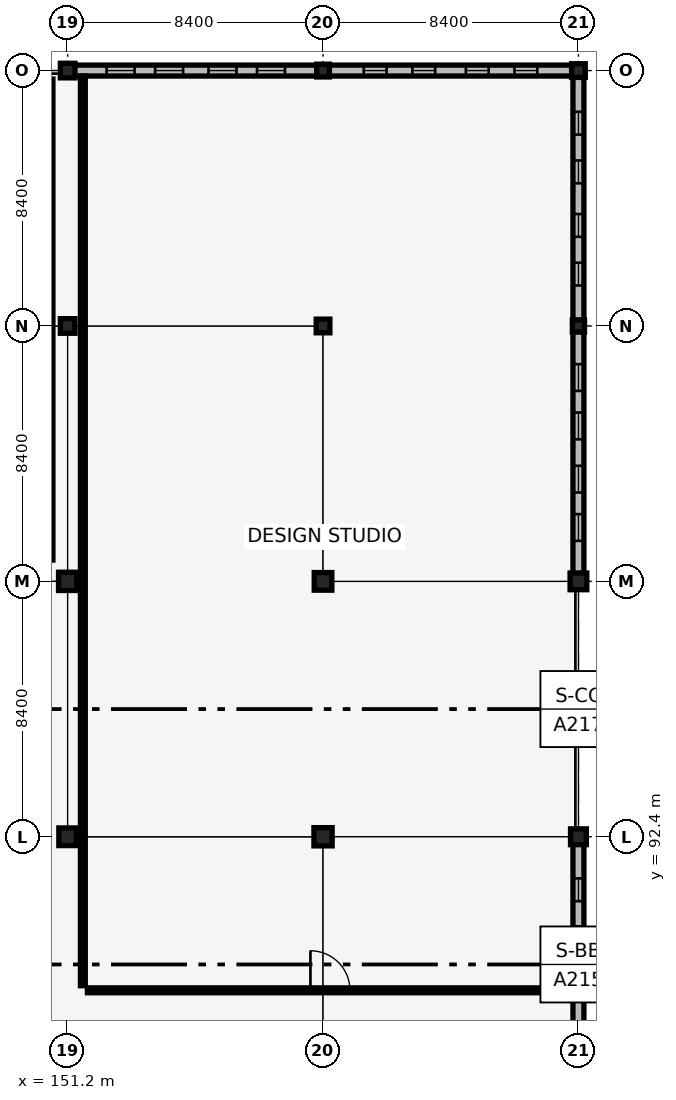
"""IFC4 building model, lengths in metres.
Left out: names, types, materials, properties, quantities, classifications, styles, units other than length and angle.
Written with IfcOpenShell. Run it as: python <this file> out.ifc"""

import sys

from ifc_helpers import new_model, si_unit, direction, frame, frame_2d, origin, origin_2d, place, context, subcontext, project, spatial, rectangle, extrude, element, fill, save


model = new_model("IFC4")
c1 = context("Model", 3, precision=1e-05, world=origin(), true_north=direction((0.0, 1.0)))
c2 = subcontext(c1, "Body", "Model", "MODEL_VIEW")
j1 = project(units=[si_unit("LENGTHUNIT", "METRE"), si_unit("PLANEANGLEUNIT", "RADIAN")], contexts=[c1])
p1 = place(None, origin())
s1 = spatial("IfcSite", under=j1, at=p1, CompositionType="ELEMENT")
p2 = place(p1, origin())
s2 = spatial("IfcBuilding", under=s1, at=p2, CompositionType="ELEMENT")
p3 = place(p2, frame((0.0, 0.0, 18.02)))
s3 = spatial("IfcBuildingStorey", under=s2, at=p3, CompositionType="ELEMENT", Elevation=18.02)
p4 = place(p3, frame((151.2, 92.4, 0.0), z_axis=(0.0, 0.0, 1.0), x_axis=(1.0, 0.0, 0.0)))
e1 = element("IfcColumn", 1, at=p4, inside=s3, PredefinedType="COLUMN", context=c2, shape_type="SweptSolid", body=[
    extrude(rectangle(XDim=0.58, YDim=0.58, at=origin_2d()), origin(), (0.0, 0.0, 1.0), 3.78),
])
p5 = place(p3, frame((151.2, 100.8, 0.0), z_axis=(0.0, 0.0, 1.0), x_axis=(1.0, 0.0, 0.0)))
e2 = element("IfcColumn", 2, at=p5, inside=s3, PredefinedType="COLUMN", context=c2, shape_type="SweptSolid", body=[
    extrude(rectangle(XDim=0.6, YDim=0.6, at=origin_2d()), origin(), (0.0, 0.0, 1.0), 3.78),
])
for number, where, z_axis, x_axis in (
    (3, (151.2, 109.2, 0.0), (0.0, 0.0, 1.0), (1.0, 0.0, 0.0)),
    (4, (151.2, 117.6, 0.0), (0.0, 0.0, 1.0), (1.0, 0.0, 0.0)),
):
    element("IfcColumn", number, at=place(p3, frame(where, z_axis=z_axis, x_axis=x_axis)), inside=s3, PredefinedType="COLUMN", context=c2, shape_type="SweptSolid", body=[
        extrude(rectangle(XDim=0.48, YDim=0.48, at=origin_2d()), origin(), (0.0, 0.0, 1.0), 3.78),
    ])
p6 = place(p3, frame((159.6, 92.4, 0.0), z_axis=(0.0, 0.0, 1.0), x_axis=(1.0, 0.0, 0.0)))
e5 = element("IfcColumn", 5, at=p6, inside=s3, PredefinedType="COLUMN", context=c2, shape_type="SweptSolid", body=[
    extrude(rectangle(XDim=0.6, YDim=0.6, at=origin_2d()), origin(), (0.0, 0.0, 1.0), 3.78),
])
p7 = place(p3, frame((159.6, 100.8, 0.0), z_axis=(0.0, 0.0, 1.0), x_axis=(1.0, 0.0, 0.0)))
e6 = element("IfcColumn", 6, at=p7, inside=s3, PredefinedType="COLUMN", context=c2, shape_type="SweptSolid", body=[
    extrude(rectangle(XDim=0.58, YDim=0.58, at=origin_2d()), origin(), (0.0, 0.0, 1.0), 3.78),
])
p8 = place(p3, frame((159.6, 109.2, 0.0), z_axis=(0.0, 0.0, 1.0), x_axis=(1.0, 0.0, 0.0)))
e7 = element("IfcColumn", 7, at=p8, inside=s3, PredefinedType="COLUMN", context=c2, shape_type="SweptSolid", body=[
    extrude(rectangle(XDim=0.45, YDim=0.45, at=origin_2d()), origin(), (0.0, 0.0, 1.0), 3.78),
])
p9 = place(p3, frame((159.6, 117.6, 0.0), z_axis=(0.0, 0.0, 1.0), x_axis=(1.0, 0.0, 0.0)))
e8 = element("IfcColumn", 8, at=p9, inside=s3, PredefinedType="COLUMN", context=c2, shape_type="SweptSolid", body=[
    extrude(rectangle(XDim=0.42, YDim=0.42, at=origin_2d()), origin(), (0.0, 0.0, 1.0), 3.78),
])
p10 = place(p3, frame((168.0, 92.4, 0.0), z_axis=(0.0, 0.0, 1.0), x_axis=(1.0, 0.0, 0.0)))
e9 = element("IfcColumn", 9, at=p10, inside=s3, PredefinedType="COLUMN", context=c2, shape_type="SweptSolid", body=[
    extrude(rectangle(XDim=0.52, YDim=0.52, at=origin_2d()), origin(), (0.0, 0.0, 1.0), 3.78),
])
p11 = place(p3, frame((168.0, 100.8, 0.0), z_axis=(0.0, 0.0, 1.0), x_axis=(1.0, 0.0, 0.0)))
e10 = element("IfcColumn", 10, at=p11, inside=s3, PredefinedType="COLUMN", context=c2, shape_type="SweptSolid", body=[
    extrude(rectangle(XDim=0.55, YDim=0.55, at=origin_2d()), origin(), (0.0, 0.0, 1.0), 3.78),
])
p12 = place(p3, frame((168.0, 109.2, 0.0), z_axis=(0.0, 0.0, 1.0), x_axis=(1.0, 0.0, 0.0)))
e11 = element("IfcColumn", 11, at=p12, inside=s3, PredefinedType="COLUMN", context=c2, shape_type="SweptSolid", body=[
    extrude(rectangle(XDim=0.4, YDim=0.4, at=origin_2d()), origin(), (0.0, 0.0, 1.0), 3.78),
])
p13 = place(p3, frame((168.0, 117.6, 0.0), z_axis=(0.0, 0.0, 1.0), x_axis=(1.0, 0.0, 0.0)))
e12 = element("IfcColumn", 12, at=p13, inside=s3, PredefinedType="COLUMN", context=c2, shape_type="SweptSolid", body=[
    extrude(rectangle(XDim=0.45, YDim=0.45, at=origin_2d()), origin(), (0.0, 0.0, 1.0), 3.78),
])
p14 = place(p3, frame((151.425, 117.6, 0.0), z_axis=(0.0, 0.0, 1.0), x_axis=(1.0, 0.0, 0.0)))
e13 = element("IfcWall", 13, at=p14, inside=s3, PredefinedType="SOLIDWALL", context=c2, shape_type="SweptSolid", body=[
    extrude(rectangle(XDim=7.98, YDim=0.36, at=frame_2d((3.99, 0.0))), origin(), (0.0, 0.0, 1.0), 3.78),
])
p15 = place(p14, frame((1.056, 0.0, 0.75)))
e14 = element("IfcOpeningElement", 14, at=p15, cuts=e13, PredefinedType="OPENING", context=c2, shape_type="SweptSolid", body=[
    extrude(rectangle(XDim=0.92, YDim=2.5, at=frame_2d((0.46, 1.25))), frame((0.0, 0.19, 0.0), z_axis=(0.0, -1.0, 0.0), x_axis=(1.0, 0.0, 0.0)), (0.0, 0.0, 1.0), 0.38),
])
p16 = place(p14, frame((2.652, 0.0, 0.75)))
e15 = element("IfcOpeningElement", 15, at=p16, cuts=e13, PredefinedType="OPENING", context=c2, shape_type="SweptSolid", body=[
    extrude(rectangle(XDim=0.92, YDim=2.5, at=frame_2d((0.46, 1.25))), frame((0.0, 0.19, 0.0), z_axis=(0.0, -1.0, 0.0), x_axis=(1.0, 0.0, 0.0)), (0.0, 0.0, 1.0), 0.38),
])
p17 = place(p14, frame((4.408, 0.0, 0.75)))
e16 = element("IfcOpeningElement", 16, at=p17, cuts=e13, PredefinedType="OPENING", context=c2, shape_type="SweptSolid", body=[
    extrude(rectangle(XDim=0.92, YDim=2.5, at=frame_2d((0.46, 1.25))), frame((0.0, 0.19, 0.0), z_axis=(0.0, -1.0, 0.0), x_axis=(1.0, 0.0, 0.0)), (0.0, 0.0, 1.0), 0.38),
])
p18 = place(p14, frame((6.004, 0.0, 0.75)))
e17 = element("IfcOpeningElement", 17, at=p18, cuts=e13, PredefinedType="OPENING", context=c2, shape_type="SweptSolid", body=[
    extrude(rectangle(XDim=0.92, YDim=2.5, at=frame_2d((0.46, 1.25))), frame((0.0, 0.19, 0.0), z_axis=(0.0, -1.0, 0.0), x_axis=(1.0, 0.0, 0.0)), (0.0, 0.0, 1.0), 0.38),
])
p19 = place(p3, frame((168.0, 84.26, 0.0), z_axis=(0.0, 0.0, 1.0), x_axis=(0.0, 1.0, 0.0)))
e18 = element("IfcWall", 18, at=p19, inside=s3, PredefinedType="SOLIDWALL", context=c2, shape_type="SweptSolid", body=[
    extrude(rectangle(XDim=7.895, YDim=0.36, at=frame_2d((3.948, 0.0))), origin(), (0.0, 0.0, 1.0), 3.18),
])
p20 = place(p19, frame((1.125, 0.0, 0.7)))
e19 = element("IfcOpeningElement", 19, at=p20, cuts=e18, PredefinedType="OPENING", context=c2, shape_type="SweptSolid", body=[
    extrude(rectangle(XDim=0.75, YDim=2.1, at=frame_2d((0.375, 1.05))), frame((0.0, 0.19, 0.0), z_axis=(0.0, -1.0, 0.0), x_axis=(1.0, 0.0, 0.0)), (0.0, 0.0, 1.0), 0.38),
])
p21 = place(p19, frame((4.441, 0.0, 0.7)))
e20 = element("IfcOpeningElement", 20, at=p21, cuts=e18, PredefinedType="OPENING", context=c2, shape_type="SweptSolid", body=[
    extrude(rectangle(XDim=0.75, YDim=2.1, at=frame_2d((0.375, 1.05))), frame((0.0, 0.19, 0.0), z_axis=(0.0, -1.0, 0.0), x_axis=(1.0, 0.0, 0.0)), (0.0, 0.0, 1.0), 0.38),
])
p22 = place(p19, frame((6.02, 0.0, 0.7)))
e21 = element("IfcOpeningElement", 21, at=p22, cuts=e18, PredefinedType="OPENING", context=c2, shape_type="SweptSolid", body=[
    extrude(rectangle(XDim=0.75, YDim=2.1, at=frame_2d((0.375, 1.05))), frame((0.0, 0.19, 0.0), z_axis=(0.0, -1.0, 0.0), x_axis=(1.0, 0.0, 0.0)), (0.0, 0.0, 1.0), 0.38),
])
p23 = place(p3, frame((168.0, 101.06, 0.0), z_axis=(0.0, 0.0, 1.0), x_axis=(0.0, 1.0, 0.0)))
e22 = element("IfcWall", 22, at=p23, inside=s3, PredefinedType="SOLIDWALL", context=c2, shape_type="SweptSolid", body=[
    extrude(rectangle(XDim=7.955, YDim=0.36, at=frame_2d((3.978, 0.0))), origin(), (0.0, 0.0, 1.0), 3.78),
])
p24 = place(p23, frame((1.072, 0.0, 0.75)))
e23 = element("IfcOpeningElement", 23, at=p24, cuts=e22, PredefinedType="OPENING", context=c2, shape_type="SweptSolid", body=[
    extrude(rectangle(XDim=0.88, YDim=2.45, at=frame_2d((0.44, 1.225))), frame((0.0, 0.19, 0.0), z_axis=(0.0, -1.0, 0.0), x_axis=(1.0, 0.0, 0.0)), (0.0, 0.0, 1.0), 0.38),
])
p25 = place(p23, frame((2.662, 0.0, 0.75)))
e24 = element("IfcOpeningElement", 24, at=p25, cuts=e22, PredefinedType="OPENING", context=c2, shape_type="SweptSolid", body=[
    extrude(rectangle(XDim=0.88, YDim=2.45, at=frame_2d((0.44, 1.225))), frame((0.0, 0.19, 0.0), z_axis=(0.0, -1.0, 0.0), x_axis=(1.0, 0.0, 0.0)), (0.0, 0.0, 1.0), 0.38),
])
p26 = place(p23, frame((4.413, 0.0, 0.75)))
e25 = element("IfcOpeningElement", 25, at=p26, cuts=e22, PredefinedType="OPENING", context=c2, shape_type="SweptSolid", body=[
    extrude(rectangle(XDim=0.88, YDim=2.45, at=frame_2d((0.44, 1.225))), frame((0.0, 0.19, 0.0), z_axis=(0.0, -1.0, 0.0), x_axis=(1.0, 0.0, 0.0)), (0.0, 0.0, 1.0), 0.38),
])
p27 = place(p23, frame((6.004, 0.0, 0.75)))
e26 = element("IfcOpeningElement", 26, at=p27, cuts=e22, PredefinedType="OPENING", context=c2, shape_type="SweptSolid", body=[
    extrude(rectangle(XDim=0.88, YDim=2.45, at=frame_2d((0.44, 1.225))), frame((0.0, 0.19, 0.0), z_axis=(0.0, -1.0, 0.0), x_axis=(1.0, 0.0, 0.0)), (0.0, 0.0, 1.0), 0.38),
])
p28 = place(p3, frame((159.795, 117.6, 0.0), z_axis=(0.0, 0.0, 1.0), x_axis=(1.0, 0.0, 0.0)))
e27 = element("IfcWall", 27, at=p28, inside=s3, PredefinedType="SOLIDWALL", context=c2, shape_type="SweptSolid", body=[
    extrude(rectangle(XDim=7.995, YDim=0.36, at=frame_2d((3.998, 0.0))), origin(), (0.0, 0.0, 1.0), 3.78),
])
p29 = place(p28, frame((1.144, 0.0, 0.75)))
e28 = element("IfcOpeningElement", 28, at=p29, cuts=e27, PredefinedType="OPENING", context=c2, shape_type="SweptSolid", body=[
    extrude(rectangle(XDim=0.75, YDim=2.1, at=frame_2d((0.375, 1.05))), frame((0.0, 0.19, 0.0), z_axis=(0.0, -1.0, 0.0), x_axis=(1.0, 0.0, 0.0)), (0.0, 0.0, 1.0), 0.38),
])
p30 = place(p28, frame((2.743, 0.0, 0.75)))
e29 = element("IfcOpeningElement", 29, at=p30, cuts=e27, PredefinedType="OPENING", context=c2, shape_type="SweptSolid", body=[
    extrude(rectangle(XDim=0.75, YDim=2.1, at=frame_2d((0.375, 1.05))), frame((0.0, 0.19, 0.0), z_axis=(0.0, -1.0, 0.0), x_axis=(1.0, 0.0, 0.0)), (0.0, 0.0, 1.0), 0.38),
])
p31 = place(p28, frame((4.502, 0.0, 0.75)))
e30 = element("IfcOpeningElement", 30, at=p31, cuts=e27, PredefinedType="OPENING", context=c2, shape_type="SweptSolid", body=[
    extrude(rectangle(XDim=0.75, YDim=2.1, at=frame_2d((0.375, 1.05))), frame((0.0, 0.19, 0.0), z_axis=(0.0, -1.0, 0.0), x_axis=(1.0, 0.0, 0.0)), (0.0, 0.0, 1.0), 0.38),
])
p32 = place(p28, frame((6.101, 0.0, 0.75)))
e31 = element("IfcOpeningElement", 31, at=p32, cuts=e27, PredefinedType="OPENING", context=c2, shape_type="SweptSolid", body=[
    extrude(rectangle(XDim=0.75, YDim=2.1, at=frame_2d((0.375, 1.05))), frame((0.0, 0.19, 0.0), z_axis=(0.0, -1.0, 0.0), x_axis=(1.0, 0.0, 0.0)), (0.0, 0.0, 1.0), 0.38),
])
p33 = place(p3, frame((168.0, 109.385, 0.0), z_axis=(0.0, 0.0, 1.0), x_axis=(0.0, 1.0, 0.0)))
e32 = element("IfcWall", 32, at=p33, inside=s3, PredefinedType="SOLIDWALL", context=c2, shape_type="SweptSolid", body=[
    extrude(rectangle(XDim=8.005, YDim=0.36, at=frame_2d((4.002, 0.0))), origin(), (0.0, 0.0, 1.0), 3.78),
])
p34 = place(p33, frame((1.146, 0.0, 0.75)))
e33 = element("IfcOpeningElement", 33, at=p34, cuts=e32, PredefinedType="OPENING", context=c2, shape_type="SweptSolid", body=[
    extrude(rectangle(XDim=0.75, YDim=2.1, at=frame_2d((0.375, 1.05))), frame((0.0, 0.19, 0.0), z_axis=(0.0, -1.0, 0.0), x_axis=(1.0, 0.0, 0.0)), (0.0, 0.0, 1.0), 0.38),
])
p35 = place(p33, frame((2.747, 0.0, 0.75)))
e34 = element("IfcOpeningElement", 34, at=p35, cuts=e32, PredefinedType="OPENING", context=c2, shape_type="SweptSolid", body=[
    extrude(rectangle(XDim=0.75, YDim=2.1, at=frame_2d((0.375, 1.05))), frame((0.0, 0.19, 0.0), z_axis=(0.0, -1.0, 0.0), x_axis=(1.0, 0.0, 0.0)), (0.0, 0.0, 1.0), 0.38),
])
p36 = place(p33, frame((4.508, 0.0, 0.75)))
e35 = element("IfcOpeningElement", 35, at=p36, cuts=e32, PredefinedType="OPENING", context=c2, shape_type="SweptSolid", body=[
    extrude(rectangle(XDim=0.75, YDim=2.1, at=frame_2d((0.375, 1.05))), frame((0.0, 0.19, 0.0), z_axis=(0.0, -1.0, 0.0), x_axis=(1.0, 0.0, 0.0)), (0.0, 0.0, 1.0), 0.38),
])
p37 = place(p33, frame((6.109, 0.0, 0.75)))
e36 = element("IfcOpeningElement", 36, at=p37, cuts=e32, PredefinedType="OPENING", context=c2, shape_type="SweptSolid", body=[
    extrude(rectangle(XDim=0.75, YDim=2.1, at=frame_2d((0.375, 1.05))), frame((0.0, 0.19, 0.0), z_axis=(0.0, -1.0, 0.0), x_axis=(1.0, 0.0, 0.0)), (0.0, 0.0, 1.0), 0.38),
])
p38 = place(p3, frame((151.85, 87.35, 0.0), z_axis=(0.0, 0.0, 1.0), x_axis=(1.0, 0.0, 0.0)))
e37 = element("IfcWall", 37, at=p38, inside=s3, PredefinedType="PARTITIONING", context=c2, shape_type="SweptSolid", body=[
    extrude(rectangle(XDim=15.97, YDim=0.16, at=frame_2d((7.985, 0.0))), origin(), (0.0, 0.0, 1.0), 3.18),
])
p39 = place(p38, frame((7.335, 0.0, 0.0)))
e38 = element("IfcOpeningElement", 38, at=p39, cuts=e37, PredefinedType="OPENING", context=c2, shape_type="SweptSolid", body=[
    extrude(rectangle(XDim=1.3, YDim=2.2, at=frame_2d((0.65, 1.1))), frame((0.0, 0.09, 0.0), z_axis=(0.0, -1.0, 0.0), x_axis=(1.0, 0.0, 0.0)), (0.0, 0.0, 1.0), 0.18),
])
p40 = place(p3, frame((151.7, 87.5, 0.0), z_axis=(0.0, 0.0, 1.0), x_axis=(0.0, 1.0, 0.0)))
e39 = element("IfcWall", 39, at=p40, inside=s3, PredefinedType="PARTITIONING", context=c2, shape_type="SweptSolid", body=[
    extrude(rectangle(XDim=29.92, YDim=0.16, at=frame_2d((14.96, 0.0))), origin(), (0.0, 0.0, 1.0), 3.16),
])
p41 = place(p3, frame((150.65, 101.5, 0.0), z_axis=(0.0, 0.0, 1.0), x_axis=(0.0, 1.0, 0.0)))
e40 = element("IfcWall", 40, at=p41, inside=s3, PredefinedType="PARTITIONING", context=c2, shape_type="SweptSolid", body=[
    extrude(rectangle(XDim=15.82, YDim=0.13, at=frame_2d((7.91, 0.0))), origin(), (0.0, 0.0, 1.0), 3.78),
])
p42 = place(p15, origin())
e41 = element("IfcWindow", 41, at=p42, inside=s3, PartitioningType="DOUBLE_PANEL_VERTICAL", PredefinedType="WINDOW", context=c2, shape_type="SweptSolid", body=[
    extrude(rectangle(XDim=0.92, YDim=2.5, at=frame_2d((0.46, 1.25))), frame((0.0, 0.03, 0.0), z_axis=(0.0, -1.0, 0.0), x_axis=(1.0, 0.0, 0.0)), (0.0, 0.0, 1.0), 0.06),
])
fill(e14, e41)
p43 = place(p16, origin())
e42 = element("IfcWindow", 42, at=p43, inside=s3, PartitioningType="DOUBLE_PANEL_VERTICAL", PredefinedType="WINDOW", context=c2, shape_type="SweptSolid", body=[
    extrude(rectangle(XDim=0.92, YDim=2.5, at=frame_2d((0.46, 1.25))), frame((0.0, 0.03, 0.0), z_axis=(0.0, -1.0, 0.0), x_axis=(1.0, 0.0, 0.0)), (0.0, 0.0, 1.0), 0.06),
])
fill(e15, e42)
p44 = place(p17, origin())
e43 = element("IfcWindow", 43, at=p44, inside=s3, PartitioningType="DOUBLE_PANEL_VERTICAL", PredefinedType="WINDOW", context=c2, shape_type="SweptSolid", body=[
    extrude(rectangle(XDim=0.92, YDim=2.5, at=frame_2d((0.46, 1.25))), frame((0.0, 0.03, 0.0), z_axis=(0.0, -1.0, 0.0), x_axis=(1.0, 0.0, 0.0)), (0.0, 0.0, 1.0), 0.06),
])
fill(e16, e43)
p45 = place(p18, origin())
e44 = element("IfcWindow", 44, at=p45, inside=s3, PartitioningType="DOUBLE_PANEL_VERTICAL", PredefinedType="WINDOW", context=c2, shape_type="SweptSolid", body=[
    extrude(rectangle(XDim=0.92, YDim=2.5, at=frame_2d((0.46, 1.25))), frame((0.0, 0.03, 0.0), z_axis=(0.0, -1.0, 0.0), x_axis=(1.0, 0.0, 0.0)), (0.0, 0.0, 1.0), 0.06),
])
fill(e17, e44)
p46 = place(p21, origin())
e45 = element("IfcWindow", 45, at=p46, inside=s3, PartitioningType="DOUBLE_PANEL_VERTICAL", PredefinedType="WINDOW", context=c2, shape_type="SweptSolid", body=[
    extrude(rectangle(XDim=0.75, YDim=2.1, at=frame_2d((0.375, 1.05))), frame((0.0, 0.03, 0.0), z_axis=(0.0, -1.0, 0.0), x_axis=(1.0, 0.0, 0.0)), (0.0, 0.0, 1.0), 0.06),
])
fill(e20, e45)
p47 = place(p22, origin())
e46 = element("IfcWindow", 46, at=p47, inside=s3, PartitioningType="DOUBLE_PANEL_VERTICAL", PredefinedType="WINDOW", context=c2, shape_type="SweptSolid", body=[
    extrude(rectangle(XDim=0.75, YDim=2.1, at=frame_2d((0.375, 1.05))), frame((0.0, 0.03, 0.0), z_axis=(0.0, -1.0, 0.0), x_axis=(1.0, 0.0, 0.0)), (0.0, 0.0, 1.0), 0.06),
])
fill(e21, e46)
p48 = place(p24, origin())
e47 = element("IfcWindow", 47, at=p48, inside=s3, PartitioningType="DOUBLE_PANEL_VERTICAL", PredefinedType="WINDOW", context=c2, shape_type="SweptSolid", body=[
    extrude(rectangle(XDim=0.88, YDim=2.45, at=frame_2d((0.44, 1.225))), frame((0.0, 0.03, 0.0), z_axis=(0.0, -1.0, 0.0), x_axis=(1.0, 0.0, 0.0)), (0.0, 0.0, 1.0), 0.06),
])
fill(e23, e47)
p49 = place(p25, origin())
e48 = element("IfcWindow", 48, at=p49, inside=s3, PartitioningType="DOUBLE_PANEL_VERTICAL", PredefinedType="WINDOW", context=c2, shape_type="SweptSolid", body=[
    extrude(rectangle(XDim=0.88, YDim=2.45, at=frame_2d((0.44, 1.225))), frame((0.0, 0.03, 0.0), z_axis=(0.0, -1.0, 0.0), x_axis=(1.0, 0.0, 0.0)), (0.0, 0.0, 1.0), 0.06),
])
fill(e24, e48)
p50 = place(p26, origin())
e49 = element("IfcWindow", 49, at=p50, inside=s3, PartitioningType="DOUBLE_PANEL_VERTICAL", PredefinedType="WINDOW", context=c2, shape_type="SweptSolid", body=[
    extrude(rectangle(XDim=0.88, YDim=2.45, at=frame_2d((0.44, 1.225))), frame((0.0, 0.03, 0.0), z_axis=(0.0, -1.0, 0.0), x_axis=(1.0, 0.0, 0.0)), (0.0, 0.0, 1.0), 0.06),
])
fill(e25, e49)
p51 = place(p27, origin())
e50 = element("IfcWindow", 50, at=p51, inside=s3, PartitioningType="DOUBLE_PANEL_VERTICAL", PredefinedType="WINDOW", context=c2, shape_type="SweptSolid", body=[
    extrude(rectangle(XDim=0.88, YDim=2.45, at=frame_2d((0.44, 1.225))), frame((0.0, 0.03, 0.0), z_axis=(0.0, -1.0, 0.0), x_axis=(1.0, 0.0, 0.0)), (0.0, 0.0, 1.0), 0.06),
])
fill(e26, e50)
p52 = place(p29, origin())
e51 = element("IfcWindow", 51, at=p52, inside=s3, PartitioningType="DOUBLE_PANEL_VERTICAL", PredefinedType="WINDOW", context=c2, shape_type="SweptSolid", body=[
    extrude(rectangle(XDim=0.75, YDim=2.1, at=frame_2d((0.375, 1.05))), frame((0.0, 0.03, 0.0), z_axis=(0.0, -1.0, 0.0), x_axis=(1.0, 0.0, 0.0)), (0.0, 0.0, 1.0), 0.06),
])
fill(e28, e51)
p53 = place(p30, origin())
e52 = element("IfcWindow", 52, at=p53, inside=s3, PartitioningType="DOUBLE_PANEL_VERTICAL", PredefinedType="WINDOW", context=c2, shape_type="SweptSolid", body=[
    extrude(rectangle(XDim=0.75, YDim=2.1, at=frame_2d((0.375, 1.05))), frame((0.0, 0.03, 0.0), z_axis=(0.0, -1.0, 0.0), x_axis=(1.0, 0.0, 0.0)), (0.0, 0.0, 1.0), 0.06),
])
fill(e29, e52)
p54 = place(p31, origin())
e53 = element("IfcWindow", 53, at=p54, inside=s3, PartitioningType="DOUBLE_PANEL_VERTICAL", PredefinedType="WINDOW", context=c2, shape_type="SweptSolid", body=[
    extrude(rectangle(XDim=0.75, YDim=2.1, at=frame_2d((0.375, 1.05))), frame((0.0, 0.03, 0.0), z_axis=(0.0, -1.0, 0.0), x_axis=(1.0, 0.0, 0.0)), (0.0, 0.0, 1.0), 0.06),
])
fill(e30, e53)
p55 = place(p32, origin())
e54 = element("IfcWindow", 54, at=p55, inside=s3, PartitioningType="DOUBLE_PANEL_VERTICAL", PredefinedType="WINDOW", context=c2, shape_type="SweptSolid", body=[
    extrude(rectangle(XDim=0.75, YDim=2.1, at=frame_2d((0.375, 1.05))), frame((0.0, 0.03, 0.0), z_axis=(0.0, -1.0, 0.0), x_axis=(1.0, 0.0, 0.0)), (0.0, 0.0, 1.0), 0.06),
])
fill(e31, e54)
p56 = place(p34, origin())
e55 = element("IfcWindow", 55, at=p56, inside=s3, PartitioningType="DOUBLE_PANEL_VERTICAL", PredefinedType="WINDOW", context=c2, shape_type="SweptSolid", body=[
    extrude(rectangle(XDim=0.75, YDim=2.1, at=frame_2d((0.375, 1.05))), frame((0.0, 0.03, 0.0), z_axis=(0.0, -1.0, 0.0), x_axis=(1.0, 0.0, 0.0)), (0.0, 0.0, 1.0), 0.06),
])
fill(e33, e55)
p57 = place(p35, origin())
e56 = element("IfcWindow", 56, at=p57, inside=s3, PartitioningType="DOUBLE_PANEL_VERTICAL", PredefinedType="WINDOW", context=c2, shape_type="SweptSolid", body=[
    extrude(rectangle(XDim=0.75, YDim=2.1, at=frame_2d((0.375, 1.05))), frame((0.0, 0.03, 0.0), z_axis=(0.0, -1.0, 0.0), x_axis=(1.0, 0.0, 0.0)), (0.0, 0.0, 1.0), 0.06),
])
fill(e34, e56)
p58 = place(p36, origin())
e57 = element("IfcWindow", 57, at=p58, inside=s3, PartitioningType="DOUBLE_PANEL_VERTICAL", PredefinedType="WINDOW", context=c2, shape_type="SweptSolid", body=[
    extrude(rectangle(XDim=0.75, YDim=2.1, at=frame_2d((0.375, 1.05))), frame((0.0, 0.03, 0.0), z_axis=(0.0, -1.0, 0.0), x_axis=(1.0, 0.0, 0.0)), (0.0, 0.0, 1.0), 0.06),
])
fill(e35, e57)
p59 = place(p37, origin())
e58 = element("IfcWindow", 58, at=p59, inside=s3, PartitioningType="DOUBLE_PANEL_VERTICAL", PredefinedType="WINDOW", context=c2, shape_type="SweptSolid", body=[
    extrude(rectangle(XDim=0.75, YDim=2.1, at=frame_2d((0.375, 1.05))), frame((0.0, 0.03, 0.0), z_axis=(0.0, -1.0, 0.0), x_axis=(1.0, 0.0, 0.0)), (0.0, 0.0, 1.0), 0.06),
])
fill(e36, e58)
p60 = place(p39, origin())
e59 = element("IfcDoor", 59, at=p60, inside=s3, OperationType="SINGLE_SWING_LEFT", PredefinedType="DOOR", context=c2, shape_type="SweptSolid", body=[
    extrude(rectangle(XDim=1.3, YDim=2.2, at=frame_2d((0.65, 1.1))), frame((0.0, 0.025, 0.0), z_axis=(0.0, -1.0, 0.0), x_axis=(1.0, 0.0, 0.0)), (0.0, 0.0, 1.0), 0.05),
])
fill(e38, e59)
save(model, sys.argv[1])
